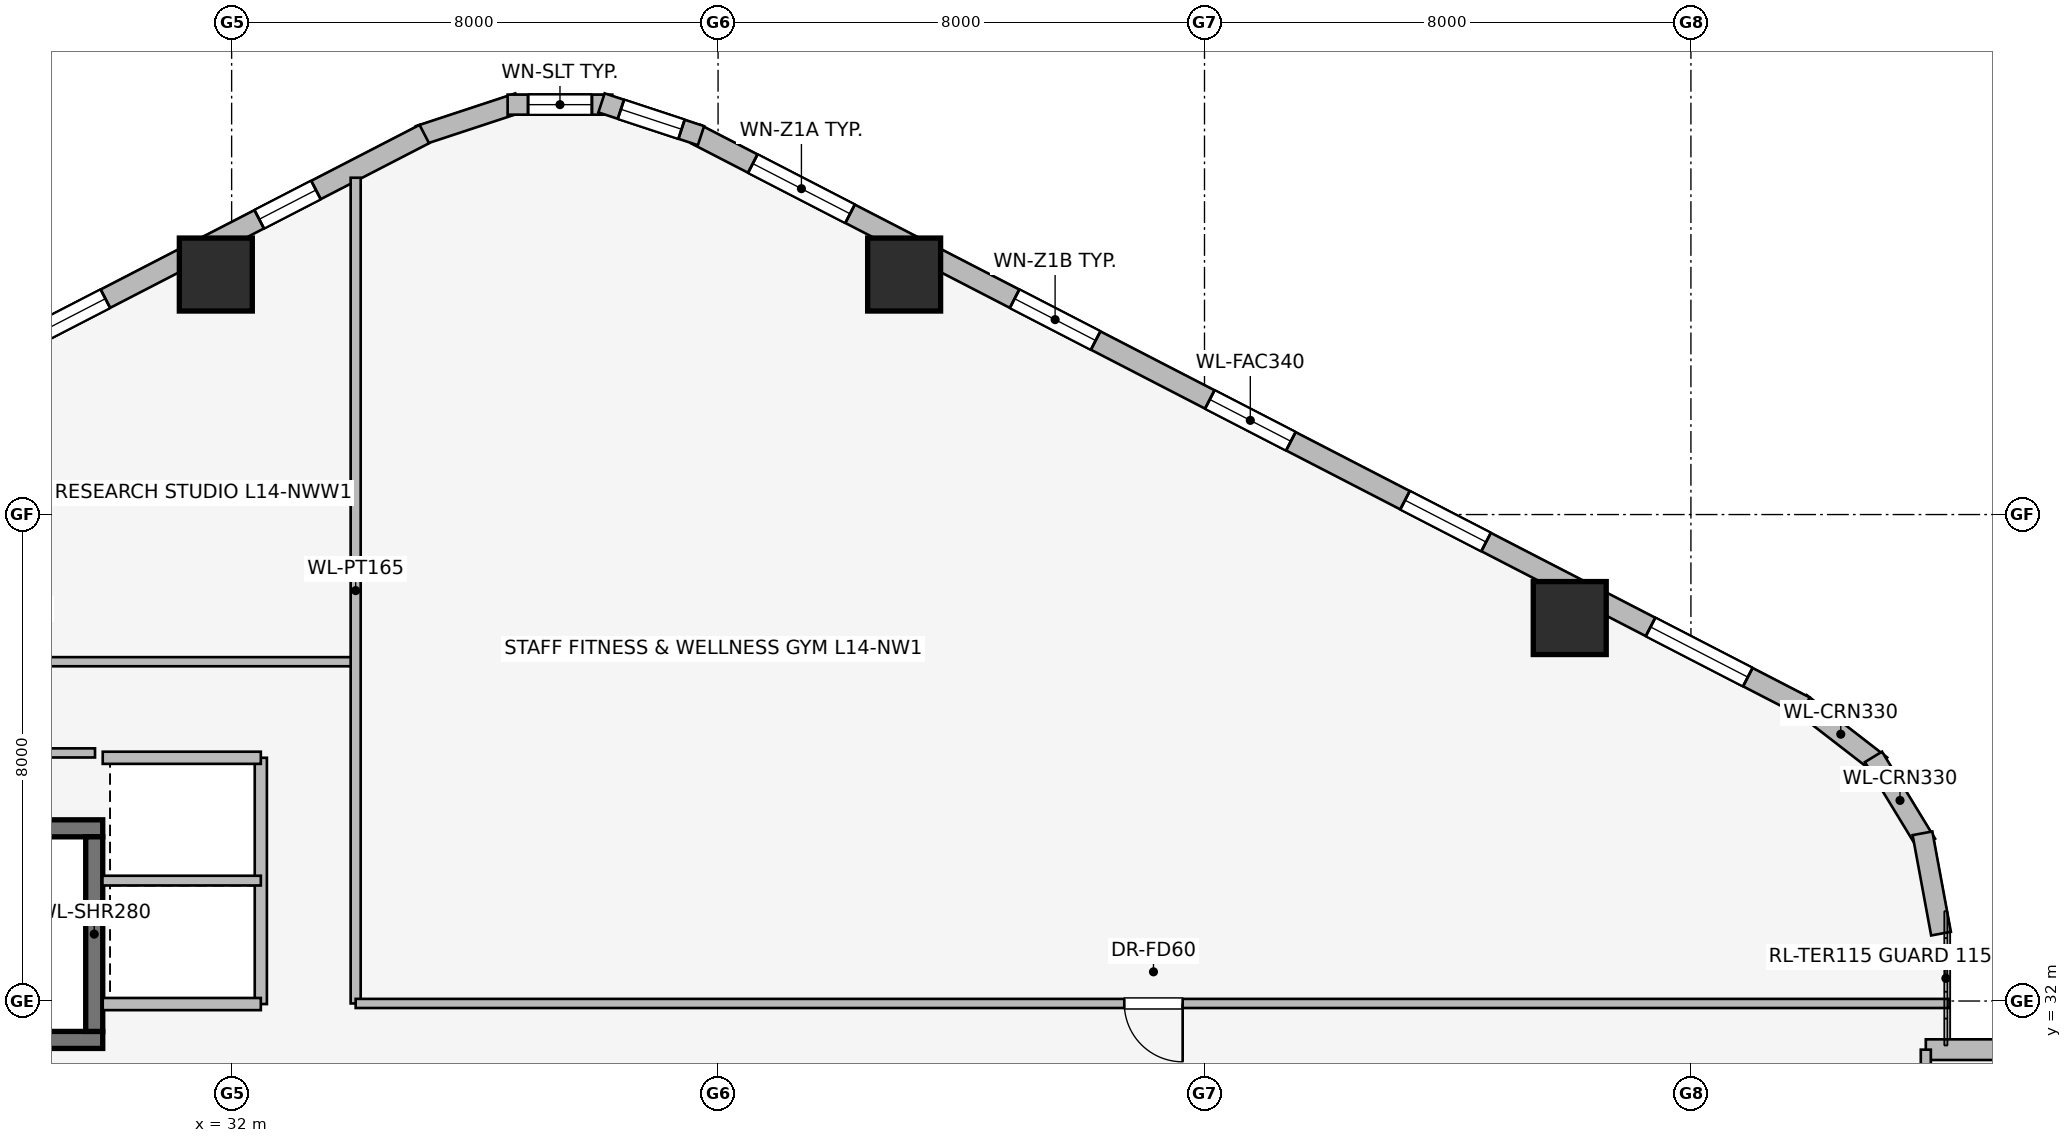
"""IFC4 building model, lengths in metres.
Left out: names, types, materials, properties, quantities, classifications, styles, units other than length and angle.
Written with IfcOpenShell. Run it as: python <this file> out.ifc"""

import sys

from ifc_helpers import new_model, si_unit, direction, frame, frame_2d, origin, origin_2d, place, context, subcontext, project, spatial, rectangle, extrude, element, fill, save


model = new_model("IFC4")
c1 = context("Model", 3, precision=1e-05, world=origin(), true_north=direction((0.0, 1.0)))
c2 = subcontext(c1, "Body", "Model", "MODEL_VIEW")
j1 = project(units=[si_unit("LENGTHUNIT", "METRE"), si_unit("PLANEANGLEUNIT", "RADIAN")], contexts=[c1])
p1 = place(None, origin())
s1 = spatial("IfcSite", under=j1, at=p1, CompositionType="ELEMENT")
p2 = place(p1, origin())
s2 = spatial("IfcBuilding", under=s1, at=p2, CompositionType="ELEMENT")
p3 = place(p2, frame((0.0, 0.0, 56.2)))
s3 = spatial("IfcBuildingStorey", under=s2, at=p3, CompositionType="ELEMENT", Elevation=56.2)
p4 = place(p3, frame((21.52, 31.36, 0.0), z_axis=(0.0, 0.0, 1.0), x_axis=(1.0, 0.0, 0.0)))
e1 = element("IfcWall", 1, at=p4, inside=s3, PredefinedType="SHEAR", context=c2, shape_type="SweptSolid", body=[
    extrude(rectangle(XDim=8.36, YDim=0.28, at=frame_2d((4.18, 0.0))), origin(), (0.0, 0.0, 1.0), 3.65),
])
p5 = place(p4, frame((0.45, 0.0, 0.0)))
e2 = element("IfcOpeningElement", 2, at=p5, cuts=e1, PredefinedType="OPENING", context=c2, shape_type="SweptSolid", body=[
    extrude(rectangle(XDim=1.05, YDim=2.0, at=frame_2d((0.525, 1.0))), frame((0.0, 0.15, 0.0), z_axis=(0.0, -1.0, 0.0), x_axis=(1.0, 0.0, 0.0)), (0.0, 0.0, 1.0), 0.3),
])
p6 = place(p3, frame((29.88, 34.84, 0.0), z_axis=(0.0, 0.0, 1.0), x_axis=(-1.0, 0.0, 0.0)))
e3 = element("IfcWall", 3, at=p6, inside=s3, PredefinedType="SHEAR", context=c2, shape_type="SweptSolid", body=[
    extrude(rectangle(XDim=8.36, YDim=0.28, at=frame_2d((4.18, 0.0))), origin(), (0.0, 0.0, 1.0), 3.65),
])
p7 = place(p3, frame((29.74, 31.5, 0.0), z_axis=(0.0, 0.0, 1.0), x_axis=(0.0, 1.0, 0.0)))
e4 = element("IfcWall", 4, at=p7, inside=s3, PredefinedType="SHEAR", context=c2, shape_type="SweptSolid", body=[
    extrude(rectangle(XDim=3.2, YDim=0.28, at=frame_2d((1.6, 0.0))), origin(), (0.0, 0.0, 1.0), 3.65),
])
for number, where, z_axis, x_axis in (
    (5, (54.007, 38.298, 0.0), (0.0, 0.0, 1.0), (1.0, 0.0, 0.0)),
    (6, (43.06, 43.947, 0.0), (0.0, 0.0, 1.0), (1.0, 0.0, 0.0)),
    (7, (31.74, 43.947, 0.0), (0.0, 0.0, 1.0), (1.0, 0.0, 0.0)),
):
    element("IfcColumn", number, at=place(p3, frame(where, z_axis=z_axis, x_axis=x_axis)), inside=s3, PredefinedType="COLUMN", context=c2, shape_type="SweptSolid", body=[
        extrude(rectangle(XDim=1.2, YDim=1.2, at=origin_2d()), origin(), (0.0, 0.0, 1.0), 3.65),
    ])
p8 = place(p3, frame((57.802, 36.901, 0.0), z_axis=(0.0, 0.0, 1.0), x_axis=(0.790691856293, -0.61221433207, 0.0)))
e8 = element("IfcWall", 8, at=p8, inside=s3, PredefinedType="STANDARD", context=c2, shape_type="SweptSolid", body=[
    extrude(rectangle(XDim=1.676, YDim=0.33, at=frame_2d((0.838, 0.0))), origin(), (0.0, 0.0, 1.0), 3.36),
])
p9 = place(p3, frame((59.002, 36.015, 0.0), z_axis=(0.0, 0.0, 1.0), x_axis=(0.520584129191, -0.853810379671, 0.0)))
e9 = element("IfcWall", 9, at=p9, inside=s3, PredefinedType="STANDARD", context=c2, shape_type="SweptSolid", body=[
    extrude(rectangle(XDim=1.677, YDim=0.33, at=frame_2d((0.838, 0.0))), origin(), (0.0, 0.0, 1.0), 3.36),
])
p10 = place(p3, frame((59.808, 34.758, 0.0), z_axis=(0.0, 0.0, 1.0), x_axis=(0.181714143354, -0.983351397063, 0.0)))
e10 = element("IfcWall", 10, at=p10, inside=s3, PredefinedType="STANDARD", context=c2, shape_type="SweptSolid", body=[
    extrude(rectangle(XDim=1.678, YDim=0.33, at=frame_2d((0.839, 0.0))), origin(), (0.0, 0.0, 1.0), 3.36),
])
p11 = place(p3, frame((39.631, 46.257, 0.0), z_axis=(0.0, 0.0, 1.0), x_axis=(0.888634413993, -0.458616264721, 0.0)))
e11 = element("IfcWall", 11, at=p11, inside=s3, PredefinedType="STANDARD", context=c2, shape_type="SweptSolid", body=[
    extrude(rectangle(XDim=20.531, YDim=0.34, at=frame_2d((10.266, 0.0))), origin(), (0.0, 0.0, 1.0), 2.654),
])
p12 = place(p11, frame((1.058, 0.0, 0.75)))
e12 = element("IfcOpeningElement", 12, at=p12, cuts=e11, PredefinedType="OPENING", context=c2, shape_type="SweptSolid", body=[
    extrude(rectangle(XDim=1.8, YDim=1.5, at=frame_2d((0.9, 0.75))), frame((0.0, 0.18, 0.0), z_axis=(0.0, -1.0, 0.0), x_axis=(1.0, 0.0, 0.0)), (0.0, 0.0, 1.0), 0.36),
])
p13 = place(p11, frame((5.903, 0.0, 0.75)))
e13 = element("IfcOpeningElement", 13, at=p13, cuts=e11, PredefinedType="OPENING", context=c2, shape_type="SweptSolid", body=[
    extrude(rectangle(XDim=1.5, YDim=1.5, at=frame_2d((0.75, 0.75))), frame((0.0, 0.18, 0.0), z_axis=(0.0, -1.0, 0.0), x_axis=(1.0, 0.0, 0.0)), (0.0, 0.0, 1.0), 0.36),
])
p14 = place(p11, frame((9.516, 0.0, 0.75)))
e14 = element("IfcOpeningElement", 14, at=p14, cuts=e11, PredefinedType="OPENING", context=c2, shape_type="SweptSolid", body=[
    extrude(rectangle(XDim=1.5, YDim=1.5, at=frame_2d((0.75, 0.75))), frame((0.0, 0.18, 0.0), z_axis=(0.0, -1.0, 0.0), x_axis=(1.0, 0.0, 0.0)), (0.0, 0.0, 1.0), 0.36),
])
p15 = place(p11, frame((13.129, 0.0, 0.75)))
e15 = element("IfcOpeningElement", 15, at=p15, cuts=e11, PredefinedType="OPENING", context=c2, shape_type="SweptSolid", body=[
    extrude(rectangle(XDim=1.5, YDim=1.5, at=frame_2d((0.75, 0.75))), frame((0.0, 0.18, 0.0), z_axis=(0.0, -1.0, 0.0), x_axis=(1.0, 0.0, 0.0)), (0.0, 0.0, 1.0), 0.36),
])
p16 = place(p11, frame((17.673, 0.0, 0.75)))
e16 = element("IfcOpeningElement", 16, at=p16, cuts=e11, PredefinedType="OPENING", context=c2, shape_type="SweptSolid", body=[
    extrude(rectangle(XDim=1.8, YDim=1.5, at=frame_2d((0.9, 0.75))), frame((0.0, 0.18, 0.0), z_axis=(0.0, -1.0, 0.0), x_axis=(1.0, 0.0, 0.0)), (0.0, 0.0, 1.0), 0.36),
])
p17 = place(p3, frame((35.081, 46.231, 0.0), z_axis=(0.0, 0.0, 1.0), x_axis=(0.94976901097, 0.312951794691, 0.0)))
e17 = element("IfcWall", 17, at=p17, inside=s3, PredefinedType="STANDARD", context=c2, shape_type="SweptSolid", body=[
    extrude(rectangle(XDim=1.722, YDim=0.33, at=frame_2d((0.861, 0.0))), origin(), (0.0, 0.0, 1.0), 3.36),
])
p18 = place(p3, frame((36.539, 46.741, 0.0), z_axis=(0.0, 0.0, 1.0), x_axis=(1.0, 0.0, 0.0)))
e18 = element("IfcWall", 18, at=p18, inside=s3, PredefinedType="STANDARD", context=c2, shape_type="SweptSolid", body=[
    extrude(rectangle(XDim=1.722, YDim=0.33, at=frame_2d((0.861, 0.0))), origin(), (0.0, 0.0, 1.0), 3.36),
])
p19 = place(p18, frame((0.336, 0.0, 0.75)))
e19 = element("IfcOpeningElement", 19, at=p19, cuts=e18, PredefinedType="OPENING", context=c2, shape_type="SweptSolid", body=[
    extrude(rectangle(XDim=1.05, YDim=1.4, at=frame_2d((0.525, 0.7))), frame((0.0, 0.175, 0.0), z_axis=(0.0, -1.0, 0.0), x_axis=(1.0, 0.0, 0.0)), (0.0, 0.0, 1.0), 0.35),
])
p20 = place(p3, frame((38.083, 46.77, 0.0), z_axis=(0.0, 0.0, 1.0), x_axis=(0.94976901097, -0.312951794691, 0.0)))
e20 = element("IfcWall", 20, at=p20, inside=s3, PredefinedType="STANDARD", context=c2, shape_type="SweptSolid", body=[
    extrude(rectangle(XDim=1.722, YDim=0.33, at=frame_2d((0.861, 0.0))), origin(), (0.0, 0.0, 1.0), 3.36),
])
p21 = place(p20, frame((0.336, 0.0, 0.75)))
e21 = element("IfcOpeningElement", 21, at=p21, cuts=e20, PredefinedType="OPENING", context=c2, shape_type="SweptSolid", body=[
    extrude(rectangle(XDim=1.05, YDim=1.4, at=frame_2d((0.525, 0.7))), frame((0.0, 0.175, 0.0), z_axis=(0.0, -1.0, 0.0), x_axis=(1.0, 0.0, 0.0)), (0.0, 0.0, 1.0), 0.35),
])
p22 = place(p3, frame((16.924, 36.841, 0.0), z_axis=(0.0, 0.0, 1.0), x_axis=(0.888634413993, 0.458616264721, 0.0)))
e22 = element("IfcWall", 22, at=p22, inside=s3, PredefinedType="STANDARD", context=c2, shape_type="SweptSolid", body=[
    extrude(rectangle(XDim=20.531, YDim=0.34, at=frame_2d((10.266, 0.0))), origin(), (0.0, 0.0, 1.0), 2.654),
])
p23 = place(p22, frame((2.161, 0.0, 0.75)))
e23 = element("IfcOpeningElement", 23, at=p23, cuts=e22, PredefinedType="OPENING", context=c2, shape_type="SweptSolid", body=[
    extrude(rectangle(XDim=1.05, YDim=1.4, at=frame_2d((0.525, 0.7))), frame((0.0, 0.18, 0.0), z_axis=(0.0, -1.0, 0.0), x_axis=(1.0, 0.0, 0.0)), (0.0, 0.0, 1.0), 0.36),
])
p24 = place(p22, frame((5.903, 0.0, 0.75)))
e24 = element("IfcOpeningElement", 24, at=p24, cuts=e22, PredefinedType="OPENING", context=c2, shape_type="SweptSolid", body=[
    extrude(rectangle(XDim=1.5, YDim=1.5, at=frame_2d((0.75, 0.75))), frame((0.0, 0.18, 0.0), z_axis=(0.0, -1.0, 0.0), x_axis=(1.0, 0.0, 0.0)), (0.0, 0.0, 1.0), 0.36),
])
p25 = place(p22, frame((9.516, 0.0, 0.75)))
e25 = element("IfcOpeningElement", 25, at=p25, cuts=e22, PredefinedType="OPENING", context=c2, shape_type="SweptSolid", body=[
    extrude(rectangle(XDim=1.5, YDim=1.5, at=frame_2d((0.75, 0.75))), frame((0.0, 0.18, 0.0), z_axis=(0.0, -1.0, 0.0), x_axis=(1.0, 0.0, 0.0)), (0.0, 0.0, 1.0), 0.36),
])
p26 = place(p22, frame((13.129, 0.0, 0.75)))
e26 = element("IfcOpeningElement", 26, at=p26, cuts=e22, PredefinedType="OPENING", context=c2, shape_type="SweptSolid", body=[
    extrude(rectangle(XDim=1.5, YDim=1.5, at=frame_2d((0.75, 0.75))), frame((0.0, 0.18, 0.0), z_axis=(0.0, -1.0, 0.0), x_axis=(1.0, 0.0, 0.0)), (0.0, 0.0, 1.0), 0.36),
])
p27 = place(p22, frame((17.476, 0.0, 0.75)))
e27 = element("IfcOpeningElement", 27, at=p27, cuts=e22, PredefinedType="OPENING", context=c2, shape_type="SweptSolid", body=[
    extrude(rectangle(XDim=1.05, YDim=1.4, at=frame_2d((0.525, 0.7))), frame((0.0, 0.18, 0.0), z_axis=(0.0, -1.0, 0.0), x_axis=(1.0, 0.0, 0.0)), (0.0, 0.0, 1.0), 0.36),
])
p28 = place(p3, frame((59.863, 31.2, 0.0), z_axis=(0.0, 0.0, 1.0), x_axis=(1.0, 0.0, 0.0)))
e28 = element("IfcWall", 28, at=p28, inside=s3, PredefinedType="STANDARD", context=c2, shape_type="SweptSolid", body=[
    extrude(rectangle(XDim=19.0, YDim=0.34, at=frame_2d((9.5, 0.0))), origin(), (0.0, 0.0, 1.0), 3.36),
])
p29 = place(p28, frame((2.633, 0.0, 0.75)))
e29 = element("IfcOpeningElement", 29, at=p29, cuts=e28, PredefinedType="OPENING", context=c2, shape_type="SweptSolid", body=[
    extrude(rectangle(XDim=1.8, YDim=1.5, at=frame_2d((0.9, 0.75))), frame((0.0, 0.18, 0.0), z_axis=(0.0, -1.0, 0.0), x_axis=(1.0, 0.0, 0.0)), (0.0, 0.0, 1.0), 0.36),
])
p30 = place(p28, frame((8.6, 0.0, 0.75)))
e30 = element("IfcOpeningElement", 30, at=p30, cuts=e28, PredefinedType="OPENING", context=c2, shape_type="SweptSolid", body=[
    extrude(rectangle(XDim=1.8, YDim=1.5, at=frame_2d((0.9, 0.75))), frame((0.0, 0.18, 0.0), z_axis=(0.0, -1.0, 0.0), x_axis=(1.0, 0.0, 0.0)), (0.0, 0.0, 1.0), 0.36),
])
p31 = place(p28, frame((14.567, 0.0, 0.75)))
e31 = element("IfcOpeningElement", 31, at=p31, cuts=e28, PredefinedType="OPENING", context=c2, shape_type="SweptSolid", body=[
    extrude(rectangle(XDim=1.8, YDim=1.5, at=frame_2d((0.9, 0.75))), frame((0.0, 0.18, 0.0), z_axis=(0.0, -1.0, 0.0), x_axis=(1.0, 0.0, 0.0)), (0.0, 0.0, 1.0), 0.36),
])
p32 = place(p3, frame((32.48, 31.95, 0.0), z_axis=(0.0, 0.0, 1.0), x_axis=(0.0, 1.0, 0.0)))
e32 = element("IfcWall", 32, at=p32, inside=s3, PredefinedType="PARTITIONING", context=c2, shape_type="SweptSolid", body=[
    extrude(rectangle(XDim=4.05, YDim=0.2, at=frame_2d((2.025, 0.0))), origin(), (0.0, 0.0, 1.0), 2.483),
])
for number, where, z_axis, x_axis in (
    (33, (29.88, 36.0, 0.0), (0.0, 0.0, 1.0), (1.0, 0.0, 0.0)),
    (34, (32.48, 31.95, 0.0), (0.0, 0.0, 1.0), (-1.0, 0.0, 0.0)),
):
    element("IfcWall", number, at=place(p3, frame(where, z_axis=z_axis, x_axis=x_axis)), inside=s3, PredefinedType="PARTITIONING", context=c2, shape_type="SweptSolid", body=[
        extrude(rectangle(XDim=2.6, YDim=0.2, at=frame_2d((1.3, 0.0))), origin(), (0.0, 0.0, 1.0), 3.36),
    ])
p33 = place(p3, frame((29.875, 33.98, 0.0), z_axis=(0.0, 0.0, 1.0), x_axis=(1.0, 0.0, 0.0)))
e35 = element("IfcWall", 35, at=p33, inside=s3, PredefinedType="PARTITIONING", context=c2, shape_type="SweptSolid", body=[
    extrude(rectangle(XDim=2.605, YDim=0.16, at=frame_2d((1.302, 0.0))), origin(), (0.0, 0.0, 1.0), 3.36),
])
p34 = place(p3, frame((34.0, 37.58, 0.0), z_axis=(0.0, 0.0, 1.0), x_axis=(-1.0, 0.0, 0.0)))
e36 = element("IfcWall", 36, at=p34, inside=s3, PredefinedType="PARTITIONING", context=c2, shape_type="SweptSolid", body=[
    extrude(rectangle(XDim=15.6, YDim=0.15, at=frame_2d((7.8, 0.0))), origin(), (0.0, 0.0, 1.0), 3.36),
])
p35 = place(p34, frame((5.195, 0.0, 0.0)))
e37 = element("IfcOpeningElement", 37, at=p35, cuts=e36, PredefinedType="OPENING", context=c2, shape_type="SweptSolid", body=[
    extrude(rectangle(XDim=0.96, YDim=2.0, at=frame_2d((0.48, 1.0))), frame((0.0, 0.085, 0.0), z_axis=(0.0, -1.0, 0.0), x_axis=(1.0, 0.0, 0.0)), (0.0, 0.0, 1.0), 0.17),
])
p36 = place(p3, frame((34.04, 31.96, 0.0), z_axis=(0.0, 0.0, 1.0), x_axis=(0.0, 1.0, 0.0)))
e38 = element("IfcWall", 38, at=p36, inside=s3, PredefinedType="PARTITIONING", context=c2, shape_type="SweptSolid", body=[
    extrude(rectangle(XDim=13.579, YDim=0.165, at=frame_2d((6.79, 0.0))), origin(), (0.0, 0.0, 1.0), 3.36),
])
p37 = place(p3, frame((60.253, 31.96, 0.0), z_axis=(0.0, 0.0, 1.0), x_axis=(-1.0, 0.0, 0.0)))
e39 = element("IfcWall", 39, at=p37, inside=s3, PredefinedType="PARTITIONING", context=c2, shape_type="SweptSolid", body=[
    extrude(rectangle(XDim=26.213, YDim=0.15, at=frame_2d((13.106, 0.0))), origin(), (0.0, 0.0, 1.0), 3.36),
])
p38 = place(p37, frame((12.612, 0.0, 0.0)))
e40 = element("IfcOpeningElement", 40, at=p38, cuts=e39, PredefinedType="OPENING", context=c2, shape_type="SweptSolid", body=[
    extrude(rectangle(XDim=0.96, YDim=2.0, at=frame_2d((0.48, 1.0))), frame((0.0, 0.085, 0.0), z_axis=(0.0, -1.0, 0.0), x_axis=(1.0, 0.0, 0.0)), (0.0, 0.0, 1.0), 0.17),
])
p39 = place(p3, frame((59.863, 16.8, 0.0), z_axis=(0.0, 0.0, 1.0), x_axis=(0.0, 1.0, 0.0)))
e41 = element("IfcWall", 41, at=p39, inside=s3, PredefinedType="PARTITIONING", context=c2, shape_type="SweptSolid", body=[
    extrude(rectangle(XDim=14.4, YDim=0.165, at=frame_2d((7.2, 0.0))), origin(), (0.0, 0.0, 1.0), 2.654),
])
p40 = place(p39, frame((2.45, 0.0, 0.0)))
e42 = element("IfcOpeningElement", 42, at=p40, cuts=e41, PredefinedType="OPENING", context=c2, shape_type="SweptSolid", body=[
    extrude(rectangle(XDim=0.96, YDim=2.0, at=frame_2d((0.48, 1.0))), frame((0.0, 0.093, 0.0), z_axis=(0.0, -1.0, 0.0), x_axis=(1.0, 0.0, 0.0)), (0.0, 0.0, 1.0), 0.185),
])
p41 = place(p3, frame((29.753, 36.08, 0.0), z_axis=(0.0, 0.0, 1.0), x_axis=(-1.0, 0.0, 0.0)))
e43 = element("IfcWall", 43, at=p41, inside=s3, PredefinedType="PARTITIONING", context=c2, shape_type="SweptSolid", body=[
    extrude(rectangle(XDim=7.353, YDim=0.15, at=frame_2d((3.677, 0.0))), origin(), (0.0, 0.0, 1.0), 3.36),
])
p42 = place(p12, origin())
e44 = element("IfcWindow", 44, at=p42, inside=s3, PartitioningType="SINGLE_PANEL", PredefinedType="WINDOW", context=c2, shape_type="SweptSolid", body=[
    extrude(rectangle(XDim=1.8, YDim=1.5, at=frame_2d((0.9, 0.75))), frame((0.0, 0.03, 0.0), z_axis=(0.0, -1.0, 0.0), x_axis=(1.0, 0.0, 0.0)), (0.0, 0.0, 1.0), 0.06),
])
fill(e12, e44)
p43 = place(p13, origin())
e45 = element("IfcWindow", 45, at=p43, inside=s3, PartitioningType="SINGLE_PANEL", PredefinedType="WINDOW", context=c2, shape_type="SweptSolid", body=[
    extrude(rectangle(XDim=1.5, YDim=1.5, at=frame_2d((0.75, 0.75))), frame((0.0, 0.03, 0.0), z_axis=(0.0, -1.0, 0.0), x_axis=(1.0, 0.0, 0.0)), (0.0, 0.0, 1.0), 0.06),
])
fill(e13, e45)
p44 = place(p14, origin())
e46 = element("IfcWindow", 46, at=p44, inside=s3, PartitioningType="SINGLE_PANEL", PredefinedType="WINDOW", context=c2, shape_type="SweptSolid", body=[
    extrude(rectangle(XDim=1.5, YDim=1.5, at=frame_2d((0.75, 0.75))), frame((0.0, 0.03, 0.0), z_axis=(0.0, -1.0, 0.0), x_axis=(1.0, 0.0, 0.0)), (0.0, 0.0, 1.0), 0.06),
])
fill(e14, e46)
p45 = place(p15, origin())
e47 = element("IfcWindow", 47, at=p45, inside=s3, PartitioningType="SINGLE_PANEL", PredefinedType="WINDOW", context=c2, shape_type="SweptSolid", body=[
    extrude(rectangle(XDim=1.5, YDim=1.5, at=frame_2d((0.75, 0.75))), frame((0.0, 0.03, 0.0), z_axis=(0.0, -1.0, 0.0), x_axis=(1.0, 0.0, 0.0)), (0.0, 0.0, 1.0), 0.06),
])
fill(e15, e47)
p46 = place(p16, origin())
e48 = element("IfcWindow", 48, at=p46, inside=s3, PartitioningType="SINGLE_PANEL", PredefinedType="WINDOW", context=c2, shape_type="SweptSolid", body=[
    extrude(rectangle(XDim=1.8, YDim=1.5, at=frame_2d((0.9, 0.75))), frame((0.0, 0.03, 0.0), z_axis=(0.0, -1.0, 0.0), x_axis=(1.0, 0.0, 0.0)), (0.0, 0.0, 1.0), 0.06),
])
fill(e16, e48)
p47 = place(p19, origin())
e49 = element("IfcWindow", 49, at=p47, inside=s3, PartitioningType="SINGLE_PANEL", PredefinedType="WINDOW", context=c2, shape_type="SweptSolid", body=[
    extrude(rectangle(XDim=1.05, YDim=1.4, at=frame_2d((0.525, 0.7))), frame((0.0, 0.03, 0.0), z_axis=(0.0, -1.0, 0.0), x_axis=(1.0, 0.0, 0.0)), (0.0, 0.0, 1.0), 0.06),
])
fill(e19, e49)
p48 = place(p21, origin())
e50 = element("IfcWindow", 50, at=p48, inside=s3, PartitioningType="SINGLE_PANEL", PredefinedType="WINDOW", context=c2, shape_type="SweptSolid", body=[
    extrude(rectangle(XDim=1.05, YDim=1.4, at=frame_2d((0.525, 0.7))), frame((0.0, 0.03, 0.0), z_axis=(0.0, -1.0, 0.0), x_axis=(1.0, 0.0, 0.0)), (0.0, 0.0, 1.0), 0.06),
])
fill(e21, e50)
p49 = place(p26, origin())
e51 = element("IfcWindow", 51, at=p49, inside=s3, PartitioningType="SINGLE_PANEL", PredefinedType="WINDOW", context=c2, shape_type="SweptSolid", body=[
    extrude(rectangle(XDim=1.5, YDim=1.5, at=frame_2d((0.75, 0.75))), frame((0.0, 0.03, 0.0), z_axis=(0.0, -1.0, 0.0), x_axis=(1.0, 0.0, 0.0)), (0.0, 0.0, 1.0), 0.06),
])
fill(e26, e51)
p50 = place(p27, origin())
e52 = element("IfcWindow", 52, at=p50, inside=s3, PartitioningType="SINGLE_PANEL", PredefinedType="WINDOW", context=c2, shape_type="SweptSolid", body=[
    extrude(rectangle(XDim=1.05, YDim=1.4, at=frame_2d((0.525, 0.7))), frame((0.0, 0.03, 0.0), z_axis=(0.0, -1.0, 0.0), x_axis=(1.0, 0.0, 0.0)), (0.0, 0.0, 1.0), 0.06),
])
fill(e27, e52)
p51 = place(p38, origin())
e53 = element("IfcDoor", 53, at=p51, inside=s3, OperationType="SINGLE_SWING_LEFT", PredefinedType="DOOR", context=c2, shape_type="SweptSolid", body=[
    extrude(rectangle(XDim=0.96, YDim=2.0, at=frame_2d((0.48, 1.0))), frame((0.0, 0.025, 0.0), z_axis=(0.0, -1.0, 0.0), x_axis=(1.0, 0.0, 0.0)), (0.0, 0.0, 1.0), 0.05),
])
fill(e40, e53)
save(model, sys.argv[1])
